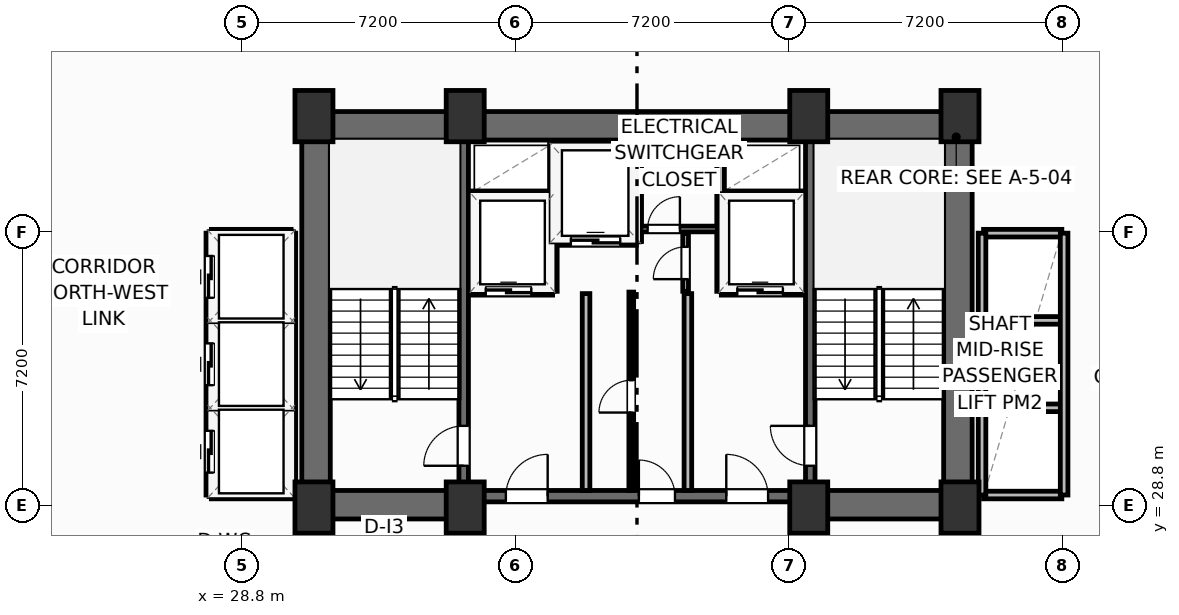
"""IFC4 building model, lengths in metres.
Left out: names, types, materials, properties, quantities, classifications, styles, units other than length and angle.
Written with IfcOpenShell. Run it as: python <this file> out.ifc"""

import sys

from ifc_helpers import new_model, si_unit, direction, frame, frame_2d, origin, origin_2d, place, context, subcontext, project, spatial, rectangle, extrude, element, fill, save


model = new_model("IFC4")
c1 = context("Model", 3, precision=1e-05, world=origin(), true_north=direction((0.0, 1.0)))
c2 = subcontext(c1, "Body", "Model", "MODEL_VIEW")
j1 = project(units=[si_unit("LENGTHUNIT", "METRE"), si_unit("PLANEANGLEUNIT", "RADIAN")], contexts=[c1])
p1 = place(None, origin())
s1 = spatial("IfcSite", under=j1, at=p1, CompositionType="ELEMENT")
p2 = place(p1, origin())
s2 = spatial("IfcBuilding", under=s1, at=p2, CompositionType="ELEMENT")
p3 = place(p2, frame((0.0, 0.0, 109.5)))
s3 = spatial("IfcBuildingStorey", under=s2, at=p3, CompositionType="ELEMENT", Elevation=109.5)
for number, where, z_axis, x_axis in (
    (1, (30.7, 28.75, 0.0), (0.0, 0.0, 1.0), (1.0, 0.0, 0.0)),
    (2, (34.68, 28.75, 0.0), (0.0, 0.0, 1.0), (1.0, 0.0, 0.0)),
    (3, (43.72, 28.75, 0.0), (0.0, 0.0, 1.0), (1.0, 0.0, 0.0)),
    (4, (47.7, 28.75, 0.0), (0.0, 0.0, 1.0), (1.0, 0.0, 0.0)),
    (5, (30.7, 39.05, 0.0), (0.0, 0.0, 1.0), (1.0, 0.0, 0.0)),
    (6, (34.68, 39.05, 0.0), (0.0, 0.0, 1.0), (1.0, 0.0, 0.0)),
    (7, (43.72, 39.05, 0.0), (0.0, 0.0, 1.0), (1.0, 0.0, 0.0)),
    (8, (47.7, 39.05, 0.0), (0.0, 0.0, 1.0), (1.0, 0.0, 0.0)),
):
    element("IfcColumn", number, at=place(p3, frame(where, z_axis=z_axis, x_axis=x_axis)), inside=s3, PredefinedType="COLUMN", context=c2, shape_type="SweptSolid", body=[
        extrude(rectangle(XDim=1.0, YDim=1.35, at=origin_2d()), origin(), (0.0, 0.0, 1.0), 3.7),
    ])
p4 = place(p3, frame((30.38, 38.795, 0.0), z_axis=(0.0, 0.0, 1.0), x_axis=(1.0, 0.0, 0.0)))
e9 = element("IfcWall", 9, at=p4, inside=s3, PredefinedType="SHEAR", context=c2, shape_type="SweptSolid", body=[
    extrude(rectangle(XDim=17.64, YDim=0.75, at=frame_2d((8.82, 0.0))), origin(), (0.0, 0.0, 1.0), 3.45),
])
for number, where, z_axis, x_axis in (
    (10, (30.755, 29.2, 0.0), (0.0, 0.0, 1.0), (0.0, 1.0, 0.0)),
    (11, (47.645, 29.2, 0.0), (0.0, 0.0, 1.0), (0.0, 1.0, 0.0)),
):
    element("IfcWall", number, at=place(p3, frame(where, z_axis=z_axis, x_axis=x_axis)), inside=s3, PredefinedType="SHEAR", context=c2, shape_type="SweptSolid", body=[
        extrude(rectangle(XDim=9.22, YDim=0.75, at=frame_2d((4.61, 0.0))), origin(), (0.0, 0.0, 1.0), 3.45),
    ])
p5 = place(p3, frame((30.38, 28.825, 0.0), z_axis=(0.0, 0.0, 1.0), x_axis=(1.0, 0.0, 0.0)))
e12 = element("IfcWall", 12, at=p5, inside=s3, PredefinedType="SHEAR", context=c2, shape_type="SweptSolid", body=[
    extrude(rectangle(XDim=4.42, YDim=0.75, at=frame_2d((2.21, 0.0))), origin(), (0.0, 0.0, 1.0), 3.45),
])
p6 = place(p3, frame((43.6, 28.825, 0.0), z_axis=(0.0, 0.0, 1.0), x_axis=(1.0, 0.0, 0.0)))
e13 = element("IfcWall", 13, at=p6, inside=s3, PredefinedType="SHEAR", context=c2, shape_type="SweptSolid", body=[
    extrude(rectangle(XDim=4.42, YDim=0.75, at=frame_2d((2.21, 0.0))), origin(), (0.0, 0.0, 1.0), 3.45),
])
p7 = place(p3, frame((34.8, 29.05, 0.0), z_axis=(0.0, 0.0, 1.0), x_axis=(1.0, 0.0, 0.0)))
e14 = element("IfcWall", 14, at=p7, inside=s3, PredefinedType="SHEAR", context=c2, shape_type="SweptSolid", body=[
    extrude(rectangle(XDim=8.8, YDim=0.3, at=frame_2d((4.4, 0.0))), origin(), (0.0, 0.0, 1.0), 3.45),
])
p8 = place(p7, frame((0.95, 0.0, 0.0)))
e15 = element("IfcOpeningElement", 15, at=p8, cuts=e14, PredefinedType="OPENING", context=c2, shape_type="SweptSolid", body=[
    extrude(rectangle(XDim=1.1, YDim=2.15, at=frame_2d((0.55, 1.075))), frame((0.0, 0.16, 0.0), z_axis=(0.0, -1.0, 0.0), x_axis=(1.0, 0.0, 0.0)), (0.0, 0.0, 1.0), 0.32),
])
p9 = place(p7, frame((6.75, 0.0, 0.0)))
e16 = element("IfcOpeningElement", 16, at=p9, cuts=e14, PredefinedType="OPENING", context=c2, shape_type="SweptSolid", body=[
    extrude(rectangle(XDim=1.1, YDim=2.15, at=frame_2d((0.55, 1.075))), frame((0.0, 0.16, 0.0), z_axis=(0.0, -1.0, 0.0), x_axis=(1.0, 0.0, 0.0)), (0.0, 0.0, 1.0), 0.32),
])
p10 = place(p7, frame((4.45, 0.0, 0.0)))
e17 = element("IfcOpeningElement", 17, at=p10, cuts=e14, PredefinedType="OPENING", context=c2, shape_type="SweptSolid", body=[
    extrude(rectangle(XDim=0.95, YDim=2.15, at=frame_2d((0.475, 1.075))), frame((0.0, 0.16, 0.0), z_axis=(0.0, -1.0, 0.0), x_axis=(1.0, 0.0, 0.0)), (0.0, 0.0, 1.0), 0.32),
])
p11 = place(p3, frame((34.64, 29.2, 0.0), z_axis=(0.0, 0.0, 1.0), x_axis=(0.0, 1.0, 0.0)))
e18 = element("IfcWall", 18, at=p11, inside=s3, PredefinedType="SHEAR", context=c2, shape_type="SweptSolid", body=[
    extrude(rectangle(XDim=9.22, YDim=0.25, at=frame_2d((4.61, 0.0))), origin(), (0.0, 0.0, 1.0), 3.45),
])
p12 = place(p11, frame((0.65, 0.0, 0.0)))
e19 = element("IfcOpeningElement", 19, at=p12, cuts=e18, PredefinedType="OPENING", context=c2, shape_type="SweptSolid", body=[
    extrude(rectangle(XDim=1.05, YDim=2.15, at=frame_2d((0.525, 1.075))), frame((0.0, 0.135, 0.0), z_axis=(0.0, -1.0, 0.0), x_axis=(1.0, 0.0, 0.0)), (0.0, 0.0, 1.0), 0.27),
])
p13 = place(p3, frame((43.76, 29.2, 0.0), z_axis=(0.0, 0.0, 1.0), x_axis=(0.0, 1.0, 0.0)))
e20 = element("IfcWall", 20, at=p13, inside=s3, PredefinedType="SHEAR", context=c2, shape_type="SweptSolid", body=[
    extrude(rectangle(XDim=9.22, YDim=0.25, at=frame_2d((4.61, 0.0))), origin(), (0.0, 0.0, 1.0), 3.45),
])
p14 = place(p13, frame((0.65, 0.0, 0.0)))
e21 = element("IfcOpeningElement", 21, at=p14, cuts=e20, PredefinedType="OPENING", context=c2, shape_type="SweptSolid", body=[
    extrude(rectangle(XDim=1.05, YDim=2.15, at=frame_2d((0.525, 1.075))), frame((0.0, 0.135, 0.0), z_axis=(0.0, -1.0, 0.0), x_axis=(1.0, 0.0, 0.0)), (0.0, 0.0, 1.0), 0.27),
])
for number, where, z_axis, x_axis in (
    (22, (37.86, 29.2, 0.0), (0.0, 0.0, 1.0), (0.0, 1.0, 0.0)),
    (23, (40.54, 29.2, 0.0), (0.0, 0.0, 1.0), (0.0, 1.0, 0.0)),
):
    element("IfcWall", number, at=place(p3, frame(where, z_axis=z_axis, x_axis=x_axis)), inside=s3, PredefinedType="PARTITIONING", context=c2, shape_type="SweptSolid", body=[
        extrude(rectangle(XDim=5.18, YDim=0.2, at=frame_2d((2.59, 0.0))), origin(), (0.0, 0.0, 1.0), 3.45),
    ])
p15 = place(p3, frame((34.8, 34.44, 0.0), z_axis=(0.0, 0.0, 1.0), x_axis=(1.0, 0.0, 0.0)))
e24 = element("IfcWall", 24, at=p15, inside=s3, PredefinedType="PARTITIONING", context=c2, shape_type="SweptSolid", body=[
    extrude(rectangle(XDim=2.18, YDim=0.2, at=frame_2d((1.09, 0.0))), origin(), (0.0, 0.0, 1.0), 3.45),
])
p16 = place(p15, frame((0.42, 0.0, 0.0)))
e25 = element("IfcOpeningElement", 25, at=p16, cuts=e24, PredefinedType="OPENING", context=c2, shape_type="SweptSolid", body=[
    extrude(rectangle(XDim=1.2, YDim=2.2, at=frame_2d((0.6, 1.1))), frame((0.0, 0.11, 0.0), z_axis=(0.0, -1.0, 0.0), x_axis=(1.0, 0.0, 0.0)), (0.0, 0.0, 1.0), 0.22),
])
p17 = place(p3, frame((34.8, 36.98, 0.0), z_axis=(0.0, 0.0, 1.0), x_axis=(1.0, 0.0, 0.0)))
e26 = element("IfcWall", 26, at=p17, inside=s3, PredefinedType="PARTITIONING", context=c2, shape_type="SweptSolid", body=[
    extrude(rectangle(XDim=2.18, YDim=0.2, at=frame_2d((1.09, 0.0))), origin(), (0.0, 0.0, 1.0), 3.45),
])
p18 = place(p3, frame((37.0, 34.44, 0.0), z_axis=(0.0, 0.0, 1.0), x_axis=(0.0, 1.0, 0.0)))
e27 = element("IfcWall", 27, at=p18, inside=s3, PredefinedType="PARTITIONING", context=c2, shape_type="SweptSolid", body=[
    extrude(rectangle(XDim=3.9, YDim=0.2, at=frame_2d((1.95, 0.0))), origin(), (0.0, 0.0, 1.0), 3.45),
])
p19 = place(p3, frame((41.42, 34.44, 0.0), z_axis=(0.0, 0.0, 1.0), x_axis=(1.0, 0.0, 0.0)))
e28 = element("IfcWall", 28, at=p19, inside=s3, PredefinedType="PARTITIONING", context=c2, shape_type="SweptSolid", body=[
    extrude(rectangle(XDim=2.18, YDim=0.2, at=frame_2d((1.09, 0.0))), origin(), (0.0, 0.0, 1.0), 3.45),
])
p20 = place(p19, frame((0.42, 0.0, 0.0)))
e29 = element("IfcOpeningElement", 29, at=p20, cuts=e28, PredefinedType="OPENING", context=c2, shape_type="SweptSolid", body=[
    extrude(rectangle(XDim=1.2, YDim=2.2, at=frame_2d((0.6, 1.1))), frame((0.0, 0.11, 0.0), z_axis=(0.0, -1.0, 0.0), x_axis=(1.0, 0.0, 0.0)), (0.0, 0.0, 1.0), 0.22),
])
p21 = place(p3, frame((41.42, 36.98, 0.0), z_axis=(0.0, 0.0, 1.0), x_axis=(1.0, 0.0, 0.0)))
e30 = element("IfcWall", 30, at=p21, inside=s3, PredefinedType="PARTITIONING", context=c2, shape_type="SweptSolid", body=[
    extrude(rectangle(XDim=2.18, YDim=0.2, at=frame_2d((1.09, 0.0))), origin(), (0.0, 0.0, 1.0), 3.45),
])
p22 = place(p3, frame((41.4, 34.44, 0.0), z_axis=(0.0, 0.0, 1.0), x_axis=(0.0, 1.0, 0.0)))
e31 = element("IfcWall", 31, at=p22, inside=s3, PredefinedType="PARTITIONING", context=c2, shape_type="SweptSolid", body=[
    extrude(rectangle(XDim=3.9, YDim=0.2, at=frame_2d((1.95, 0.0))), origin(), (0.0, 0.0, 1.0), 3.45),
])
p23 = place(p3, frame((37.06, 35.75, 0.0), z_axis=(0.0, 0.0, 1.0), x_axis=(1.0, 0.0, 0.0)))
e32 = element("IfcWall", 32, at=p23, inside=s3, PredefinedType="PARTITIONING", context=c2, shape_type="SweptSolid", body=[
    extrude(rectangle(XDim=2.12, YDim=0.2, at=frame_2d((1.06, 0.0))), origin(), (0.0, 0.0, 1.0), 3.45),
])
p24 = place(p23, frame((0.4, 0.0, 0.0)))
e33 = element("IfcOpeningElement", 33, at=p24, cuts=e32, PredefinedType="OPENING", context=c2, shape_type="SweptSolid", body=[
    extrude(rectangle(XDim=1.3, YDim=2.2, at=frame_2d((0.65, 1.1))), frame((0.0, 0.11, 0.0), z_axis=(0.0, -1.0, 0.0), x_axis=(1.0, 0.0, 0.0)), (0.0, 0.0, 1.0), 0.22),
])
p25 = place(p3, frame((39.22, 35.75, 0.0), z_axis=(0.0, 0.0, 1.0), x_axis=(0.0, 1.0, 0.0)))
e34 = element("IfcWall", 34, at=p25, inside=s3, PredefinedType="PARTITIONING", context=c2, shape_type="SweptSolid", body=[
    extrude(rectangle(XDim=2.59, YDim=0.2, at=frame_2d((1.295, 0.0))), origin(), (0.0, 0.0, 1.0), 3.45),
])
p26 = place(p3, frame((39.3, 36.08, 0.0), z_axis=(0.0, 0.0, 1.0), x_axis=(1.0, 0.0, 0.0)))
e35 = element("IfcWall", 35, at=p26, inside=s3, PredefinedType="PARTITIONING", context=c2, shape_type="SweptSolid", body=[
    extrude(rectangle(XDim=2.02, YDim=0.15, at=frame_2d((1.01, 0.0))), origin(), (0.0, 0.0, 1.0), 3.45),
])
p27 = place(p26, frame((0.18, 0.0, 0.0)))
e36 = element("IfcOpeningElement", 36, at=p27, cuts=e35, PredefinedType="OPENING", context=c2, shape_type="SweptSolid", body=[
    extrude(rectangle(XDim=0.85, YDim=2.05, at=frame_2d((0.425, 1.025))), frame((0.0, 0.085, 0.0), z_axis=(0.0, -1.0, 0.0), x_axis=(1.0, 0.0, 0.0)), (0.0, 0.0, 1.0), 0.17),
])
p28 = place(p3, frame((40.48, 34.44, 0.0), z_axis=(0.0, 0.0, 1.0), x_axis=(0.0, 1.0, 0.0)))
e37 = element("IfcWall", 37, at=p28, inside=s3, PredefinedType="PARTITIONING", context=c2, shape_type="SweptSolid", body=[
    extrude(rectangle(XDim=1.52, YDim=0.15, at=frame_2d((0.76, 0.0))), origin(), (0.0, 0.0, 1.0), 3.45),
])
p29 = place(p28, frame((0.32, 0.0, 0.0)))
e38 = element("IfcOpeningElement", 38, at=p29, cuts=e37, PredefinedType="OPENING", context=c2, shape_type="SweptSolid", body=[
    extrude(rectangle(XDim=0.85, YDim=2.05, at=frame_2d((0.425, 1.025))), frame((0.0, 0.085, 0.0), z_axis=(0.0, -1.0, 0.0), x_axis=(1.0, 0.0, 0.0)), (0.0, 0.0, 1.0), 0.17),
])
p30 = place(p3, frame((39.05, 29.2, 0.0), z_axis=(0.0, 0.0, 1.0), x_axis=(0.0, 1.0, 0.0)))
e39 = element("IfcWall", 39, at=p30, inside=s3, PredefinedType="PARTITIONING", context=c2, shape_type="SweptSolid", body=[
    extrude(rectangle(XDim=5.22, YDim=0.125, at=frame_2d((2.61, 0.0))), origin(), (0.0, 0.0, 1.0), 3.45),
])
p31 = place(p30, frame((2.05, 0.0, 0.0)))
e40 = element("IfcOpeningElement", 40, at=p31, cuts=e39, PredefinedType="OPENING", context=c2, shape_type="SweptSolid", body=[
    extrude(rectangle(XDim=0.85, YDim=2.05, at=frame_2d((0.425, 1.025))), frame((0.0, 0.073, 0.0), z_axis=(0.0, -1.0, 0.0), x_axis=(1.0, 0.0, 0.0)), (0.0, 0.0, 1.0), 0.145),
])
for number, where, z_axis, x_axis in (
    (41, (28.02, 31.375, 0.0), (0.0, 0.0, 1.0), (1.0, 0.0, 0.0)),
    (42, (28.02, 33.675, 0.0), (0.0, 0.0, 1.0), (1.0, 0.0, 0.0)),
):
    element("IfcWall", number, at=place(p3, frame(where, z_axis=z_axis, x_axis=x_axis)), inside=s3, PredefinedType="PARTITIONING", context=c2, shape_type="SweptSolid", body=[
        extrude(rectangle(XDim=2.06, YDim=0.2, at=frame_2d((1.03, 0.0))), origin(), (0.0, 0.0, 1.0), 3.45),
    ])
for number, where, z_axis, x_axis in (
    (43, (28.0, 29.08, 0.0), (0.0, 0.0, 1.0), (1.0, 0.0, 0.0)),
    (44, (28.0, 35.97, 0.0), (0.0, 0.0, 1.0), (1.0, 0.0, 0.0)),
):
    element("IfcWall", number, at=place(p3, frame(where, z_axis=z_axis, x_axis=x_axis)), inside=s3, PredefinedType="PARTITIONING", context=c2, shape_type="SweptSolid", body=[
        extrude(rectangle(XDim=2.1, YDim=0.2, at=frame_2d((1.05, 0.0))), origin(), (0.0, 0.0, 1.0), 3.45),
    ])
p32 = place(p3, frame((30.12, 29.08, 0.0), z_axis=(0.0, 0.0, 1.0), x_axis=(0.0, 1.0, 0.0)))
e45 = element("IfcWall", 45, at=p32, inside=s3, PredefinedType="PARTITIONING", context=c2, shape_type="SweptSolid", body=[
    extrude(rectangle(XDim=6.89, YDim=0.2, at=frame_2d((3.445, 0.0))), origin(), (0.0, 0.0, 1.0), 3.45),
])
p33 = place(p3, frame((27.96, 29.08, 0.0), z_axis=(0.0, 0.0, 1.0), x_axis=(0.0, 1.0, 0.0)))
e46 = element("IfcWall", 46, at=p33, inside=s3, PredefinedType="PARTITIONING", context=c2, shape_type="SweptSolid", body=[
    extrude(rectangle(XDim=6.89, YDim=0.2, at=frame_2d((3.445, 0.0))), origin(), (0.0, 0.0, 1.0), 3.45),
])
p34 = place(p33, frame((0.59, 0.0, 0.0)))
e47 = element("IfcOpeningElement", 47, at=p34, cuts=e46, PredefinedType="OPENING", context=c2, shape_type="SweptSolid", body=[
    extrude(rectangle(XDim=1.1, YDim=2.15, at=frame_2d((0.55, 1.075))), frame((0.0, 0.11, 0.0), z_axis=(0.0, -1.0, 0.0), x_axis=(1.0, 0.0, 0.0)), (0.0, 0.0, 1.0), 0.22),
])
p35 = place(p33, frame((2.89, 0.0, 0.0)))
e48 = element("IfcOpeningElement", 48, at=p35, cuts=e46, PredefinedType="OPENING", context=c2, shape_type="SweptSolid", body=[
    extrude(rectangle(XDim=1.1, YDim=2.15, at=frame_2d((0.55, 1.075))), frame((0.0, 0.11, 0.0), z_axis=(0.0, -1.0, 0.0), x_axis=(1.0, 0.0, 0.0)), (0.0, 0.0, 1.0), 0.22),
])
p36 = place(p33, frame((5.19, 0.0, 0.0)))
e49 = element("IfcOpeningElement", 49, at=p36, cuts=e46, PredefinedType="OPENING", context=c2, shape_type="SweptSolid", body=[
    extrude(rectangle(XDim=1.1, YDim=2.15, at=frame_2d((0.55, 1.075))), frame((0.0, 0.11, 0.0), z_axis=(0.0, -1.0, 0.0), x_axis=(1.0, 0.0, 0.0)), (0.0, 0.0, 1.0), 0.22),
])
for number, where, z_axis, x_axis in (
    (50, (48.32, 31.375, 0.0), (0.0, 0.0, 1.0), (1.0, 0.0, 0.0)),
    (51, (48.32, 33.675, 0.0), (0.0, 0.0, 1.0), (1.0, 0.0, 0.0)),
):
    element("IfcWall", number, at=place(p3, frame(where, z_axis=z_axis, x_axis=x_axis)), inside=s3, PredefinedType="PARTITIONING", context=c2, shape_type="SweptSolid", body=[
        extrude(rectangle(XDim=2.06, YDim=0.2, at=frame_2d((1.03, 0.0))), origin(), (0.0, 0.0, 1.0), 3.45),
    ])
p37 = place(p3, frame((48.32, 29.08, 0.0), z_axis=(0.0, 0.0, 1.0), x_axis=(1.0, 0.0, 0.0)))
e52 = element("IfcWall", 52, at=p37, inside=s3, PredefinedType="PARTITIONING", context=c2, shape_type="SweptSolid", body=[
    extrude(rectangle(XDim=2.06, YDim=0.2, at=frame_2d((1.03, 0.0))), origin(), (0.0, 0.0, 1.0), 2.662),
])
p38 = place(p3, frame((48.32, 35.97, 0.0), z_axis=(0.0, 0.0, 1.0), x_axis=(1.0, 0.0, 0.0)))
e53 = element("IfcWall", 53, at=p38, inside=s3, PredefinedType="PARTITIONING", context=c2, shape_type="SweptSolid", body=[
    extrude(rectangle(XDim=2.06, YDim=0.2, at=frame_2d((1.03, 0.0))), origin(), (0.0, 0.0, 1.0), 3.45),
])
for number, where, z_axis, x_axis in (
    (54, (48.28, 29.08, 0.0), (0.0, 0.0, 1.0), (0.0, 1.0, 0.0)),
    (55, (50.44, 29.08, 0.0), (0.0, 0.0, 1.0), (0.0, 1.0, 0.0)),
):
    element("IfcWall", number, at=place(p3, frame(where, z_axis=z_axis, x_axis=x_axis)), inside=s3, PredefinedType="PARTITIONING", context=c2, shape_type="SweptSolid", body=[
        extrude(rectangle(XDim=6.89, YDim=0.2, at=frame_2d((3.445, 0.0))), origin(), (0.0, 0.0, 1.0), 3.45),
    ])
p39 = place(p12, origin())
e56 = element("IfcDoor", 56, at=p39, inside=s3, OperationType="SINGLE_SWING_LEFT", PredefinedType="DOOR", context=c2, shape_type="SweptSolid", body=[
    extrude(rectangle(XDim=1.05, YDim=2.15, at=frame_2d((0.525, 1.075))), frame((0.0, 0.025, 0.0), z_axis=(0.0, -1.0, 0.0), x_axis=(1.0, 0.0, 0.0)), (0.0, 0.0, 1.0), 0.05),
])
fill(e19, e56)
p40 = place(p14, origin())
e57 = element("IfcDoor", 57, at=p40, inside=s3, OperationType="SINGLE_SWING_RIGHT", PredefinedType="DOOR", context=c2, shape_type="SweptSolid", body=[
    extrude(rectangle(XDim=1.05, YDim=2.15, at=frame_2d((0.525, 1.075))), frame((0.0, 0.025, 0.0), z_axis=(0.0, -1.0, 0.0), x_axis=(1.0, 0.0, 0.0)), (0.0, 0.0, 1.0), 0.05),
])
fill(e21, e57)
p41 = place(p8, origin())
e58 = element("IfcDoor", 58, at=p41, inside=s3, OperationType="SINGLE_SWING_RIGHT", PredefinedType="DOOR", context=c2, shape_type="SweptSolid", body=[
    extrude(rectangle(XDim=1.1, YDim=2.15, at=frame_2d((0.55, 1.075))), frame((0.0, 0.025, 0.0), z_axis=(0.0, -1.0, 0.0), x_axis=(1.0, 0.0, 0.0)), (0.0, 0.0, 1.0), 0.05),
])
fill(e15, e58)
p42 = place(p9, origin())
e59 = element("IfcDoor", 59, at=p42, inside=s3, OperationType="SINGLE_SWING_LEFT", PredefinedType="DOOR", context=c2, shape_type="SweptSolid", body=[
    extrude(rectangle(XDim=1.1, YDim=2.15, at=frame_2d((0.55, 1.075))), frame((0.0, 0.025, 0.0), z_axis=(0.0, -1.0, 0.0), x_axis=(1.0, 0.0, 0.0)), (0.0, 0.0, 1.0), 0.05),
])
fill(e16, e59)
p43 = place(p16, origin())
e60 = element("IfcDoor", 60, at=p43, inside=s3, OperationType="SLIDING_TO_LEFT", PredefinedType="DOOR", context=c2, shape_type="SweptSolid", body=[
    extrude(rectangle(XDim=1.2, YDim=2.2, at=frame_2d((0.6, 1.1))), frame((0.0, 0.025, 0.0), z_axis=(0.0, -1.0, 0.0), x_axis=(1.0, 0.0, 0.0)), (0.0, 0.0, 1.0), 0.05),
])
fill(e25, e60)
p44 = place(p20, origin())
e61 = element("IfcDoor", 61, at=p44, inside=s3, OperationType="SLIDING_TO_LEFT", PredefinedType="DOOR", context=c2, shape_type="SweptSolid", body=[
    extrude(rectangle(XDim=1.2, YDim=2.2, at=frame_2d((0.6, 1.1))), frame((0.0, 0.025, 0.0), z_axis=(0.0, -1.0, 0.0), x_axis=(1.0, 0.0, 0.0)), (0.0, 0.0, 1.0), 0.05),
])
fill(e29, e61)
p45 = place(p24, origin())
e62 = element("IfcDoor", 62, at=p45, inside=s3, OperationType="SLIDING_TO_LEFT", PredefinedType="DOOR", context=c2, shape_type="SweptSolid", body=[
    extrude(rectangle(XDim=1.3, YDim=2.2, at=frame_2d((0.65, 1.1))), frame((0.0, 0.025, 0.0), z_axis=(0.0, -1.0, 0.0), x_axis=(1.0, 0.0, 0.0)), (0.0, 0.0, 1.0), 0.05),
])
fill(e33, e62)
p46 = place(p27, origin())
e63 = element("IfcDoor", 63, at=p46, inside=s3, OperationType="SINGLE_SWING_RIGHT", PredefinedType="DOOR", context=c2, shape_type="SweptSolid", body=[
    extrude(rectangle(XDim=0.85, YDim=2.05, at=frame_2d((0.425, 1.025))), frame((0.0, 0.025, 0.0), z_axis=(0.0, -1.0, 0.0), x_axis=(1.0, 0.0, 0.0)), (0.0, 0.0, 1.0), 0.05),
])
fill(e36, e63)
p47 = place(p29, origin())
e64 = element("IfcDoor", 64, at=p47, inside=s3, OperationType="SINGLE_SWING_LEFT", PredefinedType="DOOR", context=c2, shape_type="SweptSolid", body=[
    extrude(rectangle(XDim=0.85, YDim=2.05, at=frame_2d((0.425, 1.025))), frame((0.0, 0.025, 0.0), z_axis=(0.0, -1.0, 0.0), x_axis=(1.0, 0.0, 0.0)), (0.0, 0.0, 1.0), 0.05),
])
fill(e38, e64)
p48 = place(p31, origin())
e65 = element("IfcDoor", 65, at=p48, inside=s3, OperationType="SINGLE_SWING_LEFT", PredefinedType="DOOR", context=c2, shape_type="SweptSolid", body=[
    extrude(rectangle(XDim=0.85, YDim=2.05, at=frame_2d((0.425, 1.025))), frame((0.0, 0.025, 0.0), z_axis=(0.0, -1.0, 0.0), x_axis=(1.0, 0.0, 0.0)), (0.0, 0.0, 1.0), 0.05),
])
fill(e40, e65)
p49 = place(p10, origin())
e66 = element("IfcDoor", 66, at=p49, inside=s3, OperationType="SINGLE_SWING_LEFT", PredefinedType="DOOR", context=c2, shape_type="SweptSolid", body=[
    extrude(rectangle(XDim=0.95, YDim=2.15, at=frame_2d((0.475, 1.075))), frame((0.0, 0.025, 0.0), z_axis=(0.0, -1.0, 0.0), x_axis=(1.0, 0.0, 0.0)), (0.0, 0.0, 1.0), 0.05),
])
fill(e17, e66)
p50 = place(p34, origin())
e67 = element("IfcDoor", 67, at=p50, inside=s3, OperationType="SLIDING_TO_LEFT", PredefinedType="DOOR", context=c2, shape_type="SweptSolid", body=[
    extrude(rectangle(XDim=1.1, YDim=2.15, at=frame_2d((0.55, 1.075))), frame((0.0, 0.025, 0.0), z_axis=(0.0, -1.0, 0.0), x_axis=(1.0, 0.0, 0.0)), (0.0, 0.0, 1.0), 0.05),
])
fill(e47, e67)
p51 = place(p35, origin())
e68 = element("IfcDoor", 68, at=p51, inside=s3, OperationType="SLIDING_TO_LEFT", PredefinedType="DOOR", context=c2, shape_type="SweptSolid", body=[
    extrude(rectangle(XDim=1.1, YDim=2.15, at=frame_2d((0.55, 1.075))), frame((0.0, 0.025, 0.0), z_axis=(0.0, -1.0, 0.0), x_axis=(1.0, 0.0, 0.0)), (0.0, 0.0, 1.0), 0.05),
])
fill(e48, e68)
p52 = place(p36, origin())
e69 = element("IfcDoor", 69, at=p52, inside=s3, OperationType="SLIDING_TO_LEFT", PredefinedType="DOOR", context=c2, shape_type="SweptSolid", body=[
    extrude(rectangle(XDim=1.1, YDim=2.15, at=frame_2d((0.55, 1.075))), frame((0.0, 0.025, 0.0), z_axis=(0.0, -1.0, 0.0), x_axis=(1.0, 0.0, 0.0)), (0.0, 0.0, 1.0), 0.05),
])
fill(e49, e69)
save(model, sys.argv[1])
